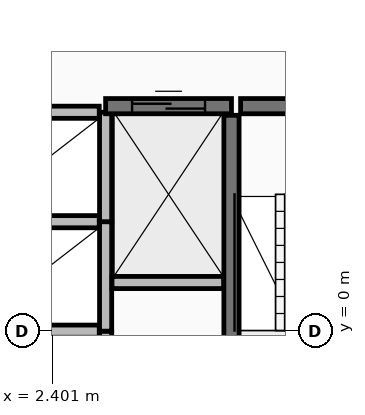
"""IFC4 building model, lengths in metres.
Left out: names, types, materials, properties, quantities, classifications, styles, units other than length and angle.
Written with IfcOpenShell. Run it as: python <this file> out.ifc"""

import sys

from ifc_helpers import new_model, si_unit, direction, frame, frame_2d, origin, place, context, subcontext, project, spatial, rectangle, extrude, element, fill, save


model = new_model("IFC4")
c1 = context("Model", 3, precision=1e-05, world=origin(), true_north=direction((0.0, 1.0)))
c2 = subcontext(c1, "Body", "Model", "MODEL_VIEW")
j1 = project(units=[si_unit("LENGTHUNIT", "METRE"), si_unit("PLANEANGLEUNIT", "RADIAN")], contexts=[c1])
p1 = place(None, origin())
s1 = spatial("IfcSite", under=j1, at=p1, CompositionType="ELEMENT")
p2 = place(p1, origin())
s2 = spatial("IfcBuilding", under=s1, at=p2, CompositionType="ELEMENT")
p3 = place(p2, frame((0.0, 0.0, 35.25)))
s3 = spatial("IfcBuildingStorey", under=s2, at=p3, CompositionType="ELEMENT", Elevation=35.25)
p4 = place(p3, frame((5.35, -3.75, 0.0), z_axis=(0.0, 0.0, 1.0), x_axis=(0.0, 1.0, 0.0)))
e1 = element("IfcWall", 1, at=p4, inside=s3, PredefinedType="SHEAR", context=c2, shape_type="SweptSolid", body=[
    extrude(rectangle(XDim=7.3, YDim=0.25, at=frame_2d((3.65, 0.0))), origin(), (0.0, 0.0, 1.0), 3.225),
])
p5 = place(p3, frame((5.5, 3.7, 0.0), z_axis=(0.0, 0.0, 1.0), x_axis=(1.0, 0.0, 0.0)))
e2 = element("IfcWall", 2, at=p5, inside=s3, PredefinedType="SHEAR", context=c2, shape_type="SweptSolid", body=[
    extrude(rectangle(XDim=3.0, YDim=0.25, at=frame_2d((1.5, 0.0))), origin(), (0.0, 0.0, 1.0), 3.225),
])
p6 = place(p5, frame((0.95, 0.0, 0.0)))
e3 = element("IfcOpeningElement", 3, at=p6, cuts=e2, PredefinedType="OPENING", context=c2, shape_type="SweptSolid", body=[
    extrude(rectangle(XDim=1.1, YDim=2.15, at=frame_2d((0.55, 1.075))), frame((0.0, 0.135, 0.0), z_axis=(0.0, -1.0, 0.0), x_axis=(1.0, 0.0, 0.0)), (0.0, 0.0, 1.0), 0.27),
])
p7 = place(p3, frame((3.28, -1.8, 0.0), z_axis=(0.0, 0.0, 1.0), x_axis=(0.0, 1.0, 0.0)))
e4 = element("IfcWall", 4, at=p7, inside=s3, PredefinedType="PARTITIONING", context=c2, shape_type="SweptSolid", body=[
    extrude(rectangle(XDim=1.8, YDim=0.2, at=frame_2d((0.9, 0.0))), origin(), (0.0, 0.0, 1.0), 3.225),
])
p8 = place(p3, frame((1.13, 0.0, 0.0), z_axis=(0.0, 0.0, 1.0), x_axis=(1.0, 0.0, 0.0)))
e5 = element("IfcWall", 5, at=p8, inside=s3, PredefinedType="PARTITIONING", context=c2, shape_type="SweptSolid", body=[
    extrude(rectangle(XDim=2.045, YDim=0.2, at=frame_2d((1.022, 0.0))), origin(), (0.0, 0.0, 1.0), 3.225),
])
p9 = place(p3, frame((3.28, 0.0, 0.0), z_axis=(0.0, 0.0, 1.0), x_axis=(0.0, 1.0, 0.0)))
e6 = element("IfcWall", 6, at=p9, inside=s3, PredefinedType="PARTITIONING", context=c2, shape_type="SweptSolid", body=[
    extrude(rectangle(XDim=1.8, YDim=0.2, at=frame_2d((0.9, 0.0))), origin(), (0.0, 0.0, 1.0), 3.225),
])
p10 = place(p3, frame((1.13, 1.8, 0.0), z_axis=(0.0, 0.0, 1.0), x_axis=(1.0, 0.0, 0.0)))
e7 = element("IfcWall", 7, at=p10, inside=s3, PredefinedType="PARTITIONING", context=c2, shape_type="SweptSolid", body=[
    extrude(rectangle(XDim=2.045, YDim=0.2, at=frame_2d((1.022, 0.0))), origin(), (0.0, 0.0, 1.0), 3.225),
])
p11 = place(p3, frame((3.28, 1.8, 0.0), z_axis=(0.0, 0.0, 1.0), x_axis=(0.0, 1.0, 0.0)))
e8 = element("IfcWall", 8, at=p11, inside=s3, PredefinedType="PARTITIONING", context=c2, shape_type="SweptSolid", body=[
    extrude(rectangle(XDim=1.8, YDim=0.2, at=frame_2d((0.9, 0.0))), origin(), (0.0, 0.0, 1.0), 3.225),
])
p12 = place(p3, frame((1.13, 3.6, 0.0), z_axis=(0.0, 0.0, 1.0), x_axis=(1.0, 0.0, 0.0)))
e9 = element("IfcWall", 9, at=p12, inside=s3, PredefinedType="PARTITIONING", context=c2, shape_type="SweptSolid", body=[
    extrude(rectangle(XDim=2.045, YDim=0.2, at=frame_2d((1.022, 0.0))), origin(), (0.0, 0.0, 1.0), 2.42),
])
p13 = place(p3, frame((3.28, 3.7, 0.0), z_axis=(0.0, 0.0, 1.0), x_axis=(1.0, 0.0, 0.0)))
e10 = element("IfcWall", 10, at=p13, inside=s3, PredefinedType="SHEAR", context=c2, shape_type="SweptSolid", body=[
    extrude(rectangle(XDim=2.07, YDim=0.25, at=frame_2d((1.035, 0.0))), origin(), (0.0, 0.0, 1.0), 3.225),
])
p14 = place(p13, frame((0.435, 0.0, 0.0)))
e11 = element("IfcOpeningElement", 11, at=p14, cuts=e10, PredefinedType="OPENING", context=c2, shape_type="SweptSolid", body=[
    extrude(rectangle(XDim=1.2, YDim=2.2, at=frame_2d((0.6, 1.1))), frame((0.0, 0.135, 0.0), z_axis=(0.0, -1.0, 0.0), x_axis=(1.0, 0.0, 0.0)), (0.0, 0.0, 1.0), 0.27),
])
p15 = place(p3, frame((3.385, 0.8, 0.0), z_axis=(0.0, 0.0, 1.0), x_axis=(1.0, 0.0, 0.0)))
e12 = element("IfcWall", 12, at=p15, inside=s3, PredefinedType="PARTITIONING", context=c2, shape_type="SweptSolid", body=[
    extrude(rectangle(XDim=1.835, YDim=0.2, at=frame_2d((0.917, 0.0))), origin(), (0.0, 0.0, 1.0), 3.225),
])
p16 = place(p14, origin())
e13 = element("IfcDoor", 13, at=p16, inside=s3, OperationType="SLIDING_TO_RIGHT", PredefinedType="DOOR", context=c2, shape_type="SweptSolid", body=[
    extrude(rectangle(XDim=1.2, YDim=2.2, at=frame_2d((0.6, 1.1))), frame((0.0, 0.025, 0.0), z_axis=(0.0, -1.0, 0.0), x_axis=(1.0, 0.0, 0.0)), (0.0, 0.0, 1.0), 0.05),
])
fill(e11, e13)
save(model, sys.argv[1])
